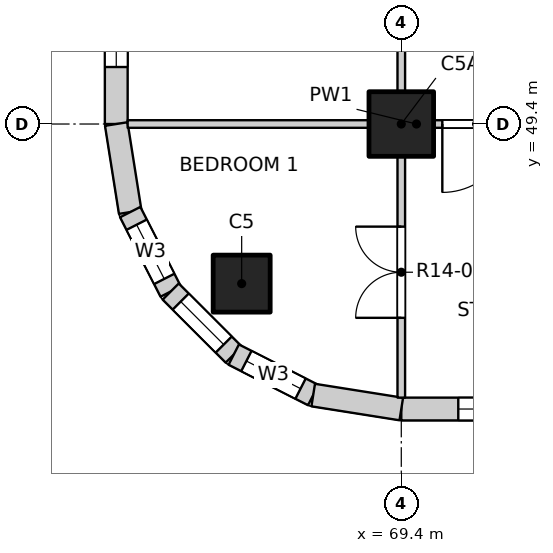
"""IFC4 building model, lengths in metres.
Left out: names, types, materials, properties, quantities, classifications, styles, units other than length and angle.
Written with IfcOpenShell. Run it as: python <this file> out.ifc"""

import sys

from ifc_helpers import new_model, si_unit, direction, frame, frame_2d, origin, origin_2d, place, context, subcontext, project, spatial, rectangle, extrude, element, fill, save


model = new_model("IFC4")
c1 = context("Model", 3, precision=1e-05, world=origin(), true_north=direction((0.0, 1.0)))
c2 = subcontext(c1, "Body", "Model", "MODEL_VIEW")
j1 = project(units=[si_unit("LENGTHUNIT", "METRE"), si_unit("PLANEANGLEUNIT", "RADIAN")], contexts=[c1])
p1 = place(None, origin())
s1 = spatial("IfcSite", under=j1, at=p1, CompositionType="ELEMENT")
p2 = place(p1, origin())
s2 = spatial("IfcBuilding", under=s1, at=p2, CompositionType="ELEMENT")
p3 = place(p2, frame((0.0, 0.0, 155.4)))
s3 = spatial("IfcBuildingStorey", under=s2, at=p3, CompositionType="ELEMENT", Elevation=155.4)
p4 = place(p3, frame((67.3, 47.3, -0.25), z_axis=(0.0, 0.0, 1.0), x_axis=(1.0, 0.0, 0.0)))
e1 = element("IfcColumn", 1, at=p4, inside=s3, PredefinedType="COLUMN", context=c2, shape_type="SweptSolid", body=[
    extrude(rectangle(XDim=0.75, YDim=0.75, at=origin_2d()), origin(), (0.0, 0.0, 1.0), 3.4),
])
p5 = place(p3, frame((69.4, 49.4, -0.25), z_axis=(0.0, 0.0, 1.0), x_axis=(1.0, 0.0, 0.0)))
e2 = element("IfcColumn", 2, at=p5, inside=s3, PredefinedType="COLUMN", context=c2, shape_type="SweptSolid", body=[
    extrude(rectangle(XDim=0.85, YDim=0.85, at=origin_2d()), origin(), (0.0, 0.0, 1.0), 3.4),
])
p6 = place(p3, frame((69.4, 45.65, 0.0), z_axis=(0.0, 0.0, 1.0), x_axis=(1.0, 0.0, 0.0)))
e3 = element("IfcWall", 3, at=p6, inside=s3, PredefinedType="SOLIDWALL", context=c2, shape_type="SweptSolid", body=[
    extrude(rectangle(XDim=3.525, YDim=0.3, at=frame_2d((1.763, 0.0))), origin(), (0.0, 0.0, 1.0), 2.7),
])
p7 = place(p6, frame((0.75, 0.0, 0.9)))
e4 = element("IfcOpeningElement", 4, at=p7, cuts=e3, PredefinedType="OPENING", context=c2, shape_type="SweptSolid", body=[
    extrude(rectangle(XDim=2.4, YDim=1.8, at=frame_2d((1.2, 0.9))), frame((0.0, 0.16, 0.0), z_axis=(0.0, -1.0, 0.0), x_axis=(1.0, 0.0, 0.0)), (0.0, 0.0, 1.0), 0.32),
])
p8 = place(p3, frame((65.65, 49.4, 0.0), z_axis=(0.0, 0.0, 1.0), x_axis=(0.0, 1.0, 0.0)))
e5 = element("IfcWall", 5, at=p8, inside=s3, PredefinedType="SOLIDWALL", context=c2, shape_type="SweptSolid", body=[
    extrude(rectangle(XDim=3.525, YDim=0.3, at=frame_2d((1.763, 0.0))), origin(), (0.0, 0.0, 1.0), 2.7),
])
p9 = place(p8, frame((0.75, 0.0, 0.9)))
e6 = element("IfcOpeningElement", 6, at=p9, cuts=e5, PredefinedType="OPENING", context=c2, shape_type="SweptSolid", body=[
    extrude(rectangle(XDim=2.4, YDim=1.8, at=frame_2d((1.2, 0.9))), frame((0.0, 0.16, 0.0), z_axis=(0.0, -1.0, 0.0), x_axis=(1.0, 0.0, 0.0)), (0.0, 0.0, 1.0), 0.32),
])
p10 = place(p3, frame((65.65, 49.4, 0.0), z_axis=(0.0, 0.0, 1.0), x_axis=(0.156496880861, -0.987678452879, 0.0)))
e7 = element("IfcWall", 7, at=p10, inside=s3, PredefinedType="SOLIDWALL", context=c2, shape_type="SweptSolid", body=[
    extrude(rectangle(XDim=1.173, YDim=0.3, at=frame_2d((0.586, 0.0))), origin(), (0.0, 0.0, 1.0), 2.7),
])
p11 = place(p3, frame((65.833, 48.241, 0.0), z_axis=(0.0, 0.0, 1.0), x_axis=(0.454025524128, -0.890988677504, 0.0)))
e8 = element("IfcWall", 8, at=p11, inside=s3, PredefinedType="SOLIDWALL", context=c2, shape_type="SweptSolid", body=[
    extrude(rectangle(XDim=1.173, YDim=0.3, at=frame_2d((0.587, 0.0))), origin(), (0.0, 0.0, 1.0), 2.7),
])
p12 = place(p11, frame((0.187, 0.0, 0.9)))
e9 = element("IfcOpeningElement", 9, at=p12, cuts=e8, PredefinedType="OPENING", context=c2, shape_type="SweptSolid", body=[
    extrude(rectangle(XDim=0.8, YDim=1.2, at=frame_2d((0.4, 0.6))), frame((0.0, 0.16, 0.0), z_axis=(0.0, -1.0, 0.0), x_axis=(1.0, 0.0, 0.0)), (0.0, 0.0, 1.0), 0.32),
])
p13 = place(p3, frame((66.366, 47.196, 0.0), z_axis=(0.0, 0.0, 1.0), x_axis=(0.707106781187, -0.707106781187, 0.0)))
e10 = element("IfcWall", 10, at=p13, inside=s3, PredefinedType="SOLIDWALL", context=c2, shape_type="SweptSolid", body=[
    extrude(rectangle(XDim=1.173, YDim=0.3, at=frame_2d((0.586, 0.0))), origin(), (0.0, 0.0, 1.0), 2.7),
])
p14 = place(p13, frame((0.187, 0.0, 0.9)))
e11 = element("IfcOpeningElement", 11, at=p14, cuts=e10, PredefinedType="OPENING", context=c2, shape_type="SweptSolid", body=[
    extrude(rectangle(XDim=0.8, YDim=1.2, at=frame_2d((0.4, 0.6))), frame((0.0, 0.16, 0.0), z_axis=(0.0, -1.0, 0.0), x_axis=(1.0, 0.0, 0.0)), (0.0, 0.0, 1.0), 0.32),
])
p15 = place(p3, frame((67.196, 46.366, 0.0), z_axis=(0.0, 0.0, 1.0), x_axis=(0.890988677504, -0.454025524128, 0.0)))
e12 = element("IfcWall", 12, at=p15, inside=s3, PredefinedType="SOLIDWALL", context=c2, shape_type="SweptSolid", body=[
    extrude(rectangle(XDim=1.173, YDim=0.3, at=frame_2d((0.587, 0.0))), origin(), (0.0, 0.0, 1.0), 2.7),
])
p16 = place(p15, frame((0.187, 0.0, 0.9)))
e13 = element("IfcOpeningElement", 13, at=p16, cuts=e12, PredefinedType="OPENING", context=c2, shape_type="SweptSolid", body=[
    extrude(rectangle(XDim=0.8, YDim=1.2, at=frame_2d((0.4, 0.6))), frame((0.0, 0.16, 0.0), z_axis=(0.0, -1.0, 0.0), x_axis=(1.0, 0.0, 0.0)), (0.0, 0.0, 1.0), 0.32),
])
p17 = place(p3, frame((68.241, 45.833, 0.0), z_axis=(0.0, 0.0, 1.0), x_axis=(0.987678452879, -0.156496880861, 0.0)))
e14 = element("IfcWall", 14, at=p17, inside=s3, PredefinedType="SOLIDWALL", context=c2, shape_type="SweptSolid", body=[
    extrude(rectangle(XDim=1.173, YDim=0.3, at=frame_2d((0.586, 0.0))), origin(), (0.0, 0.0, 1.0), 2.7),
])
p18 = place(p3, frame((65.8, 49.4, 0.0), z_axis=(0.0, 0.0, 1.0), x_axis=(1.0, 0.0, 0.0)))
e15 = element("IfcWall", 15, at=p18, inside=s3, PredefinedType="PARTITIONING", context=c2, shape_type="SweptSolid", body=[
    extrude(rectangle(XDim=7.6, YDim=0.1, at=frame_2d((3.8, 0.0))), origin(), (0.0, 0.0, 1.0), 3.15),
])
p19 = place(p18, frame((4.14, 0.0, 0.0)))
e16 = element("IfcOpeningElement", 16, at=p19, cuts=e15, PredefinedType="OPENING", context=c2, shape_type="SweptSolid", body=[
    extrude(rectangle(XDim=0.9, YDim=2.1, at=frame_2d((0.45, 1.05))), frame((0.0, 0.06, 0.0), z_axis=(0.0, -1.0, 0.0), x_axis=(1.0, 0.0, 0.0)), (0.0, 0.0, 1.0), 0.12),
])
p20 = place(p3, frame((69.4, 45.8, 0.0), z_axis=(0.0, 0.0, 1.0), x_axis=(0.0, 1.0, 0.0)))
e17 = element("IfcWall", 17, at=p20, inside=s3, PredefinedType="PARTITIONING", context=c2, shape_type="SweptSolid", body=[
    extrude(rectangle(XDim=38.4, YDim=0.1, at=frame_2d((19.2, 0.0))), origin(), (0.0, 0.0, 1.0), 3.15),
])
p21 = place(p20, frame((1.05, 0.0, 0.0)))
e18 = element("IfcOpeningElement", 18, at=p21, cuts=e17, PredefinedType="OPENING", context=c2, shape_type="SweptSolid", body=[
    extrude(rectangle(XDim=1.2, YDim=2.1, at=frame_2d((0.6, 1.05))), frame((0.0, 0.06, 0.0), z_axis=(0.0, -1.0, 0.0), x_axis=(1.0, 0.0, 0.0)), (0.0, 0.0, 1.0), 0.12),
])
p22 = place(p20, frame((6.9, 0.0, 0.0)))
e19 = element("IfcOpeningElement", 19, at=p22, cuts=e17, PredefinedType="OPENING", context=c2, shape_type="SweptSolid", body=[
    extrude(rectangle(XDim=1.2, YDim=2.1, at=frame_2d((0.6, 1.05))), frame((0.0, 0.06, 0.0), z_axis=(0.0, -1.0, 0.0), x_axis=(1.0, 0.0, 0.0)), (0.0, 0.0, 1.0), 0.12),
])
p23 = place(p20, frame((12.9, 0.0, 0.0)))
e20 = element("IfcOpeningElement", 20, at=p23, cuts=e17, PredefinedType="OPENING", context=c2, shape_type="SweptSolid", body=[
    extrude(rectangle(XDim=0.9, YDim=2.1, at=frame_2d((0.45, 1.05))), frame((0.0, 0.06, 0.0), z_axis=(0.0, -1.0, 0.0), x_axis=(1.0, 0.0, 0.0)), (0.0, 0.0, 1.0), 0.12),
])
p24 = place(p20, frame((16.8, 0.0, 0.0)))
e21 = element("IfcOpeningElement", 21, at=p24, cuts=e17, PredefinedType="OPENING", context=c2, shape_type="SweptSolid", body=[
    extrude(rectangle(XDim=0.9, YDim=2.1, at=frame_2d((0.45, 1.05))), frame((0.0, 0.06, 0.0), z_axis=(0.0, -1.0, 0.0), x_axis=(1.0, 0.0, 0.0)), (0.0, 0.0, 1.0), 0.12),
])
p25 = place(p20, frame((20.7, 0.0, 0.0)))
e22 = element("IfcOpeningElement", 22, at=p25, cuts=e17, PredefinedType="OPENING", context=c2, shape_type="SweptSolid", body=[
    extrude(rectangle(XDim=0.9, YDim=2.1, at=frame_2d((0.45, 1.05))), frame((0.0, 0.06, 0.0), z_axis=(0.0, -1.0, 0.0), x_axis=(1.0, 0.0, 0.0)), (0.0, 0.0, 1.0), 0.12),
])
p26 = place(p20, frame((24.6, 0.0, 0.0)))
e23 = element("IfcOpeningElement", 23, at=p26, cuts=e17, PredefinedType="OPENING", context=c2, shape_type="SweptSolid", body=[
    extrude(rectangle(XDim=0.9, YDim=2.1, at=frame_2d((0.45, 1.05))), frame((0.0, 0.06, 0.0), z_axis=(0.0, -1.0, 0.0), x_axis=(1.0, 0.0, 0.0)), (0.0, 0.0, 1.0), 0.12),
])
p27 = place(p20, frame((28.5, 0.0, 0.0)))
e24 = element("IfcOpeningElement", 24, at=p27, cuts=e17, PredefinedType="OPENING", context=c2, shape_type="SweptSolid", body=[
    extrude(rectangle(XDim=0.9, YDim=2.1, at=frame_2d((0.45, 1.05))), frame((0.0, 0.06, 0.0), z_axis=(0.0, -1.0, 0.0), x_axis=(1.0, 0.0, 0.0)), (0.0, 0.0, 1.0), 0.12),
])
p28 = place(p20, frame((32.4, 0.0, 0.0)))
e25 = element("IfcOpeningElement", 25, at=p28, cuts=e17, PredefinedType="OPENING", context=c2, shape_type="SweptSolid", body=[
    extrude(rectangle(XDim=0.9, YDim=2.1, at=frame_2d((0.45, 1.05))), frame((0.0, 0.06, 0.0), z_axis=(0.0, -1.0, 0.0), x_axis=(1.0, 0.0, 0.0)), (0.0, 0.0, 1.0), 0.12),
])
p29 = place(p20, frame((36.15, 0.0, 0.0)))
e26 = element("IfcOpeningElement", 26, at=p29, cuts=e17, PredefinedType="OPENING", context=c2, shape_type="SweptSolid", body=[
    extrude(rectangle(XDim=1.2, YDim=2.1, at=frame_2d((0.6, 1.05))), frame((0.0, 0.06, 0.0), z_axis=(0.0, -1.0, 0.0), x_axis=(1.0, 0.0, 0.0)), (0.0, 0.0, 1.0), 0.12),
])
p30 = place(p7, origin())
e27 = element("IfcWindow", 27, at=p30, inside=s3, PartitioningType="DOUBLE_PANEL_VERTICAL", PredefinedType="WINDOW", context=c2, shape_type="SweptSolid", body=[
    extrude(rectangle(XDim=2.4, YDim=1.8, at=frame_2d((1.2, 0.9))), frame((0.0, 0.03, 0.0), z_axis=(0.0, -1.0, 0.0), x_axis=(1.0, 0.0, 0.0)), (0.0, 0.0, 1.0), 0.06),
])
fill(e4, e27)
p31 = place(p9, origin())
e28 = element("IfcWindow", 28, at=p31, inside=s3, PartitioningType="DOUBLE_PANEL_VERTICAL", PredefinedType="WINDOW", context=c2, shape_type="SweptSolid", body=[
    extrude(rectangle(XDim=2.4, YDim=1.8, at=frame_2d((1.2, 0.9))), frame((0.0, 0.03, 0.0), z_axis=(0.0, -1.0, 0.0), x_axis=(1.0, 0.0, 0.0)), (0.0, 0.0, 1.0), 0.06),
])
fill(e6, e28)
p32 = place(p12, origin())
e29 = element("IfcWindow", 29, at=p32, inside=s3, PartitioningType="SINGLE_PANEL", PredefinedType="WINDOW", context=c2, shape_type="SweptSolid", body=[
    extrude(rectangle(XDim=0.8, YDim=1.2, at=frame_2d((0.4, 0.6))), frame((0.0, 0.03, 0.0), z_axis=(0.0, -1.0, 0.0), x_axis=(1.0, 0.0, 0.0)), (0.0, 0.0, 1.0), 0.06),
])
fill(e9, e29)
p33 = place(p14, origin())
e30 = element("IfcWindow", 30, at=p33, inside=s3, PartitioningType="SINGLE_PANEL", PredefinedType="WINDOW", context=c2, shape_type="SweptSolid", body=[
    extrude(rectangle(XDim=0.8, YDim=1.2, at=frame_2d((0.4, 0.6))), frame((0.0, 0.03, 0.0), z_axis=(0.0, -1.0, 0.0), x_axis=(1.0, 0.0, 0.0)), (0.0, 0.0, 1.0), 0.06),
])
fill(e11, e30)
p34 = place(p16, origin())
e31 = element("IfcWindow", 31, at=p34, inside=s3, PartitioningType="SINGLE_PANEL", PredefinedType="WINDOW", context=c2, shape_type="SweptSolid", body=[
    extrude(rectangle(XDim=0.8, YDim=1.2, at=frame_2d((0.4, 0.6))), frame((0.0, 0.03, 0.0), z_axis=(0.0, -1.0, 0.0), x_axis=(1.0, 0.0, 0.0)), (0.0, 0.0, 1.0), 0.06),
])
fill(e13, e31)
p35 = place(p21, origin())
e32 = element("IfcDoor", 32, at=p35, inside=s3, OperationType="DOUBLE_DOOR_SINGLE_SWING", PredefinedType="DOOR", context=c2, shape_type="SweptSolid", body=[
    extrude(rectangle(XDim=1.2, YDim=2.1, at=frame_2d((0.6, 1.05))), frame((0.0, 0.025, 0.0), z_axis=(0.0, -1.0, 0.0), x_axis=(1.0, 0.0, 0.0)), (0.0, 0.0, 1.0), 0.05),
])
fill(e18, e32)
p36 = place(p19, origin())
e33 = element("IfcDoor", 33, at=p36, inside=s3, OperationType="SINGLE_SWING_RIGHT", PredefinedType="DOOR", context=c2, shape_type="SweptSolid", body=[
    extrude(rectangle(XDim=0.9, YDim=2.1, at=frame_2d((0.45, 1.05))), frame((0.0, 0.025, 0.0), z_axis=(0.0, -1.0, 0.0), x_axis=(1.0, 0.0, 0.0)), (0.0, 0.0, 1.0), 0.05),
])
fill(e16, e33)
save(model, sys.argv[1])
